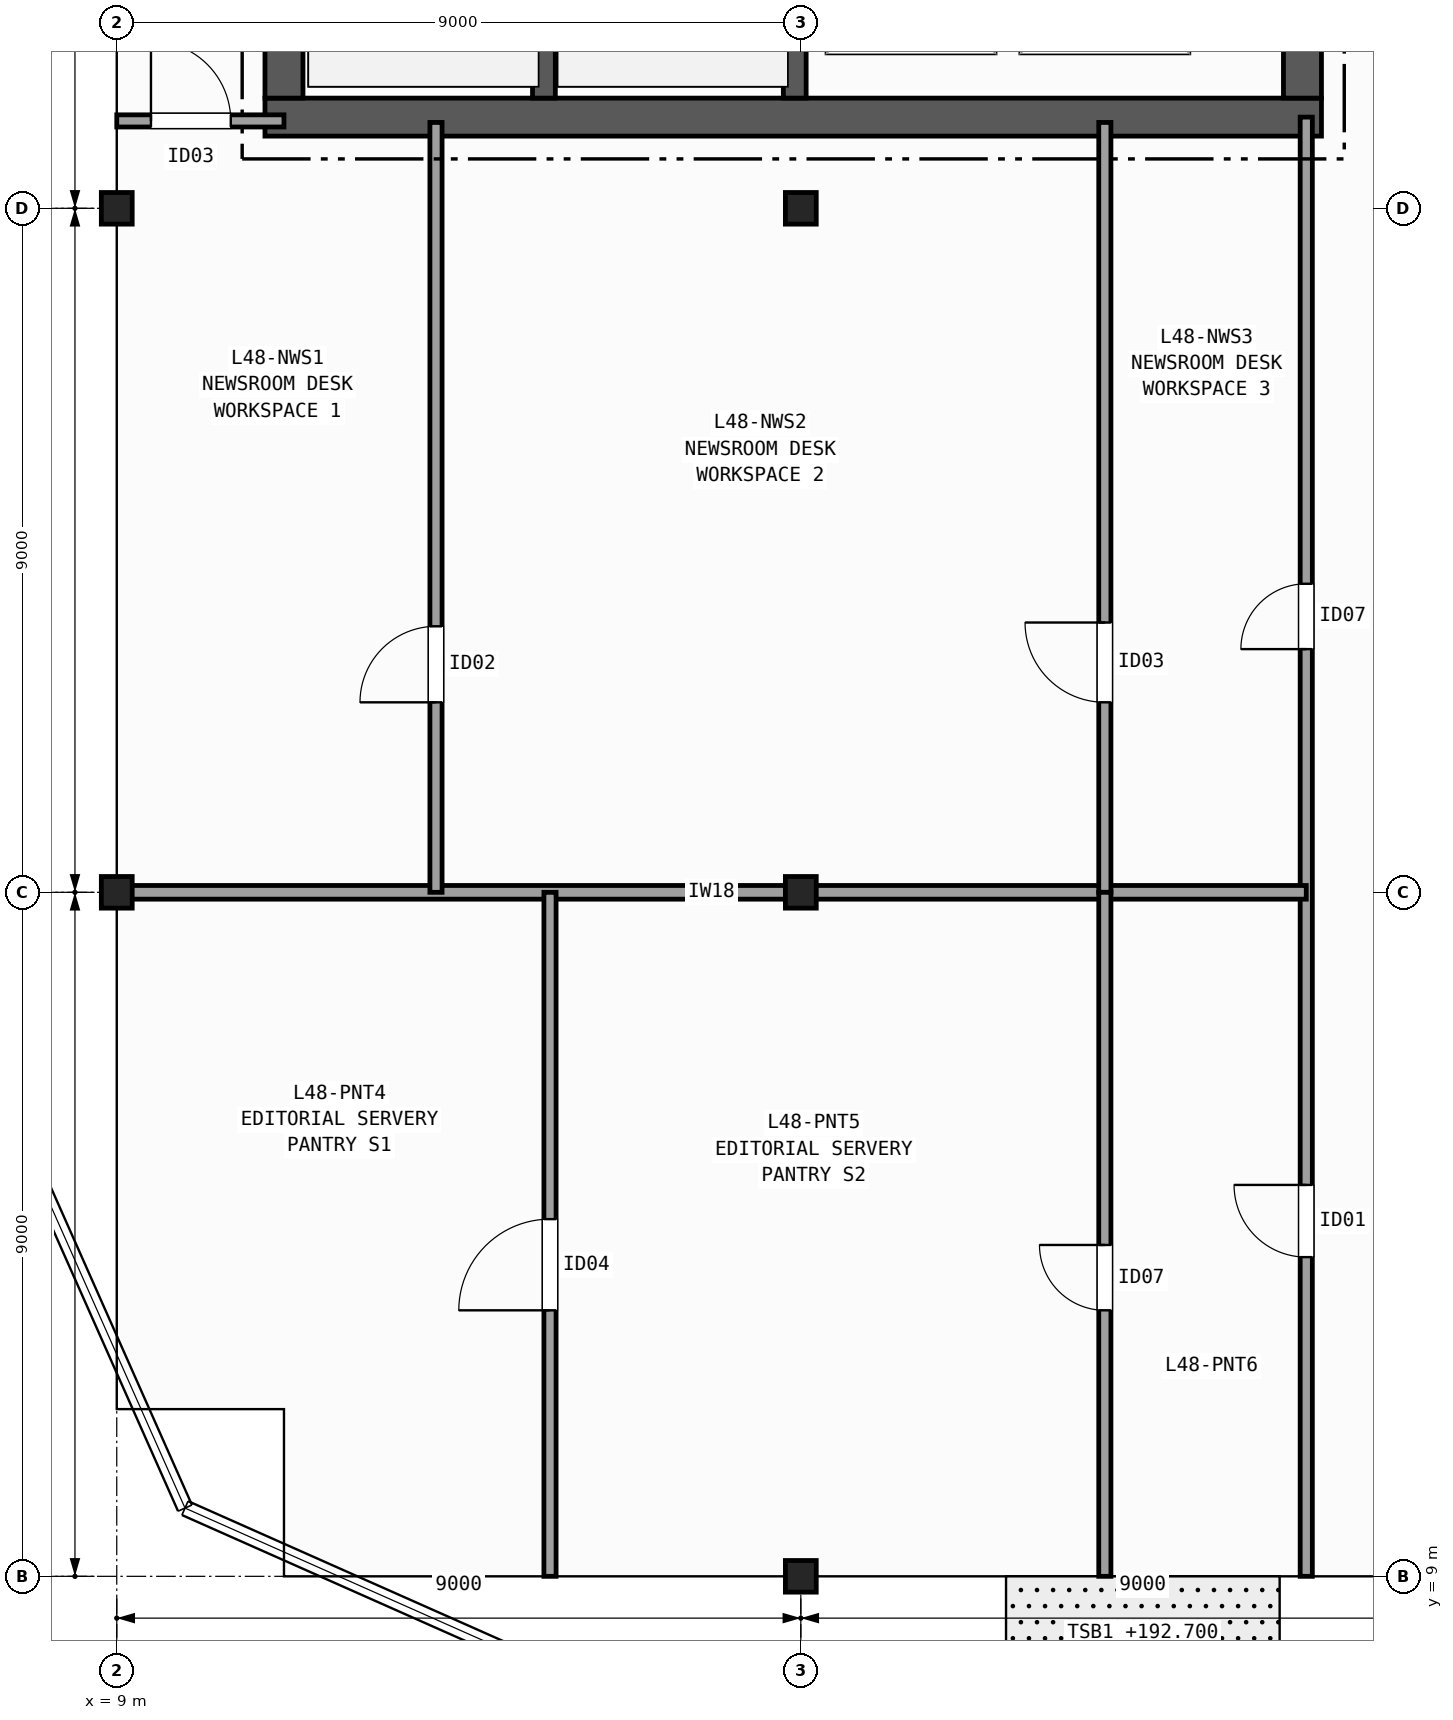
"""IFC4 building model, lengths in metres.
Left out: names, types, materials, properties, quantities, classifications, styles, units other than length and angle.
Written with IfcOpenShell. Run it as: python <this file> out.ifc"""

import sys

from ifc_helpers import new_model, si_unit, direction, frame, frame_2d, origin, origin_2d, place, context, subcontext, project, spatial, rectangle, i_section, extrude, element, fill, save


model = new_model("IFC4")
c1 = context("Model", 3, precision=1e-05, world=origin(), true_north=direction((0.0, 1.0)))
c2 = subcontext(c1, "Body", "Model", "MODEL_VIEW")
j1 = project(units=[si_unit("LENGTHUNIT", "METRE"), si_unit("PLANEANGLEUNIT", "RADIAN")], contexts=[c1])
p1 = place(None, origin())
s1 = spatial("IfcSite", under=j1, at=p1, CompositionType="ELEMENT")
p2 = place(p1, origin())
s2 = spatial("IfcBuilding", under=s1, at=p2, CompositionType="ELEMENT")
p3 = place(p2, frame((0.0, 0.0, 192.7)))
s3 = spatial("IfcBuildingStorey", under=s2, at=p3, CompositionType="ELEMENT", Elevation=192.7)
for number, where, z_axis, x_axis in (
    (1, (9.0, 18.0, 0.0), (0.0, 0.0, 1.0), (1.0, 0.0, 0.0)),
    (2, (9.0, 27.0, 0.0), (0.0, 0.0, 1.0), (1.0, 0.0, 0.0)),
    (3, (18.0, 9.0, 0.0), (0.0, 0.0, 1.0), (1.0, 0.0, 0.0)),
    (4, (18.0, 18.0, 0.0), (0.0, 0.0, 1.0), (1.0, 0.0, 0.0)),
    (5, (18.0, 27.0, 0.0), (0.0, 0.0, 1.0), (1.0, 0.0, 0.0)),
):
    element("IfcColumn", number, at=place(p3, frame(where, z_axis=z_axis, x_axis=x_axis)), inside=s3, PredefinedType="COLUMN", context=c2, shape_type="SweptSolid", body=[
        extrude(i_section(OverallWidth=0.406, OverallDepth=0.416, WebThickness=0.03, FlangeThickness=0.048, FilletRadius=0.015, at=origin_2d()), origin(), (0.0, 0.0, 1.0), 3.7),
    ])
p4 = place(p3, frame((10.95, 28.2, 0.0), z_axis=(0.0, 0.0, 1.0), x_axis=(1.0, 0.0, 0.0)))
e6 = element("IfcWall", 6, at=p4, inside=s3, PredefinedType="SHEAR", context=c2, shape_type="SweptSolid", body=[
    extrude(rectangle(XDim=13.9, YDim=0.5, at=frame_2d((6.95, 0.0))), origin(), (0.0, 0.0, 1.0), 3.37),
])
p5 = place(p3, frame((11.2, 42.15, 0.0), z_axis=(0.0, 0.0, 1.0), x_axis=(0.0, -1.0, 0.0)))
e7 = element("IfcWall", 7, at=p5, inside=s3, PredefinedType="SHEAR", context=c2, shape_type="SweptSolid", body=[
    extrude(rectangle(XDim=13.7, YDim=0.5, at=frame_2d((6.85, 0.0))), origin(), (0.0, 0.0, 1.0), 3.37),
])
p6 = place(p3, frame((24.6, 28.45, 0.0), z_axis=(0.0, 0.0, 1.0), x_axis=(0.0, 1.0, 0.0)))
e8 = element("IfcWall", 8, at=p6, inside=s3, PredefinedType="SHEAR", context=c2, shape_type="SweptSolid", body=[
    extrude(rectangle(XDim=13.7, YDim=0.5, at=frame_2d((6.85, 0.0))), origin(), (0.0, 0.0, 1.0), 3.37),
])
p7 = place(p6, frame((3.35, 0.0, 0.0)))
e9 = element("IfcOpeningElement", 9, at=p7, cuts=e8, PredefinedType="OPENING", context=c2, shape_type="SweptSolid", body=[
    extrude(rectangle(XDim=1.5, YDim=2.2, at=frame_2d((0.75, 1.1))), frame((0.0, 0.26, 0.0), z_axis=(0.0, -1.0, 0.0), x_axis=(1.0, 0.0, 0.0)), (0.0, 0.0, 1.0), 0.52),
])
p8 = place(p6, frame((9.95, 0.0, 0.0)))
e10 = element("IfcOpeningElement", 10, at=p8, cuts=e8, PredefinedType="OPENING", context=c2, shape_type="SweptSolid", body=[
    extrude(rectangle(XDim=0.9, YDim=2.1, at=frame_2d((0.45, 1.05))), frame((0.0, 0.26, 0.0), z_axis=(0.0, -1.0, 0.0), x_axis=(1.0, 0.0, 0.0)), (0.0, 0.0, 1.0), 0.52),
])
p9 = place(p3, frame((14.62, 28.45, 0.0), z_axis=(0.0, 0.0, 1.0), x_axis=(0.0, 1.0, 0.0)))
e11 = element("IfcWall", 11, at=p9, inside=s3, PredefinedType="SHEAR", context=c2, shape_type="SweptSolid", body=[
    extrude(rectangle(XDim=9.0, YDim=0.3, at=frame_2d((4.5, 0.0))), origin(), (0.0, 0.0, 1.0), 3.37),
])
p10 = place(p3, frame((17.92, 42.15, 0.0), z_axis=(0.0, 0.0, 1.0), x_axis=(0.0, -1.0, 0.0)))
e12 = element("IfcWall", 12, at=p10, inside=s3, PredefinedType="SHEAR", context=c2, shape_type="SweptSolid", body=[
    extrude(rectangle(XDim=13.7, YDim=0.3, at=frame_2d((6.85, 0.0))), origin(), (0.0, 0.0, 1.0), 3.37),
])
p11 = place(p10, frame((1.975, 0.0, 0.0)))
e13 = element("IfcOpeningElement", 13, at=p11, cuts=e12, PredefinedType="OPENING", context=c2, shape_type="SweptSolid", body=[
    extrude(rectangle(XDim=1.15, YDim=2.15, at=frame_2d((0.575, 1.075))), frame((0.0, 0.16, 0.0), z_axis=(0.0, -1.0, 0.0), x_axis=(1.0, 0.0, 0.0)), (0.0, 0.0, 1.0), 0.32),
])
p12 = place(p3, frame((9.0, 28.15, 0.0), z_axis=(0.0, 0.0, 1.0), x_axis=(1.0, 0.0, 0.0)))
e14 = element("IfcWall", 14, at=p12, inside=s3, PredefinedType="PARTITIONING", context=c2, shape_type="SweptSolid", body=[
    extrude(rectangle(XDim=2.2, YDim=0.16, at=frame_2d((1.1, 0.0))), origin(), (0.0, 0.0, 1.0), 2.584),
])
p13 = place(p12, frame((0.45, 0.0, 0.0)))
e15 = element("IfcOpeningElement", 15, at=p13, cuts=e14, PredefinedType="OPENING", context=c2, shape_type="SweptSolid", body=[
    extrude(rectangle(XDim=1.05, YDim=2.15, at=frame_2d((0.525, 1.075))), frame((0.0, 0.09, 0.0), z_axis=(0.0, -1.0, 0.0), x_axis=(1.0, 0.0, 0.0)), (0.0, 0.0, 1.0), 0.18),
])
p14 = place(p3, frame((24.65, 9.0, 0.0), z_axis=(0.0, 0.0, 1.0), x_axis=(0.0, 1.0, 0.0)))
e16 = element("IfcWall", 16, at=p14, inside=s3, PredefinedType="PARTITIONING", context=c2, shape_type="SweptSolid", body=[
    extrude(rectangle(XDim=19.2, YDim=0.16, at=frame_2d((9.6, 0.0))), origin(), (0.0, 0.0, 1.0), 2.584),
])
p15 = place(p14, frame((12.2, 0.0, 0.0)))
e17 = element("IfcOpeningElement", 17, at=p15, cuts=e16, PredefinedType="OPENING", context=c2, shape_type="SweptSolid", body=[
    extrude(rectangle(XDim=0.86, YDim=2.05, at=frame_2d((0.43, 1.025))), frame((0.0, 0.09, 0.0), z_axis=(0.0, -1.0, 0.0), x_axis=(1.0, 0.0, 0.0)), (0.0, 0.0, 1.0), 0.18),
])
p16 = place(p14, frame((4.2, 0.0, 0.0)))
e18 = element("IfcOpeningElement", 18, at=p16, cuts=e16, PredefinedType="OPENING", context=c2, shape_type="SweptSolid", body=[
    extrude(rectangle(XDim=0.95, YDim=2.1, at=frame_2d((0.475, 1.05))), frame((0.0, 0.09, 0.0), z_axis=(0.0, -1.0, 0.0), x_axis=(1.0, 0.0, 0.0)), (0.0, 0.0, 1.0), 0.18),
])
p17 = place(p3, frame((9.0, 18.0, 0.0), z_axis=(0.0, 0.0, 1.0), x_axis=(1.0, 0.0, 0.0)))
e19 = element("IfcWall", 19, at=p17, inside=s3, PredefinedType="PARTITIONING", context=c2, shape_type="SweptSolid", body=[
    extrude(rectangle(XDim=15.65, YDim=0.18, at=frame_2d((7.825, 0.0))), origin(), (0.0, 0.0, 1.0), 2.584),
])
p18 = place(p3, frame((13.2, 18.0, 0.0), z_axis=(0.0, 0.0, 1.0), x_axis=(0.0, 1.0, 0.0)))
e20 = element("IfcWall", 20, at=p18, inside=s3, PredefinedType="PARTITIONING", context=c2, shape_type="SweptSolid", body=[
    extrude(rectangle(XDim=10.13, YDim=0.16, at=frame_2d((5.065, 0.0))), origin(), (0.0, 0.0, 1.0), 2.739),
])
p19 = place(p18, frame((2.5, 0.0, 0.0)))
e21 = element("IfcOpeningElement", 21, at=p19, cuts=e20, PredefinedType="OPENING", context=c2, shape_type="SweptSolid", body=[
    extrude(rectangle(XDim=1.0, YDim=2.1, at=frame_2d((0.5, 1.05))), frame((0.0, 0.09, 0.0), z_axis=(0.0, -1.0, 0.0), x_axis=(1.0, 0.0, 0.0)), (0.0, 0.0, 1.0), 0.18),
])
p20 = place(p3, frame((22.0, 18.0, 0.0), z_axis=(0.0, 0.0, 1.0), x_axis=(0.0, 1.0, 0.0)))
e22 = element("IfcWall", 22, at=p20, inside=s3, PredefinedType="PARTITIONING", context=c2, shape_type="SweptSolid", body=[
    extrude(rectangle(XDim=10.13, YDim=0.16, at=frame_2d((5.065, 0.0))), origin(), (0.0, 0.0, 1.0), 2.739),
])
p21 = place(p20, frame((2.5, 0.0, 0.0)))
e23 = element("IfcOpeningElement", 23, at=p21, cuts=e22, PredefinedType="OPENING", context=c2, shape_type="SweptSolid", body=[
    extrude(rectangle(XDim=1.05, YDim=2.15, at=frame_2d((0.525, 1.075))), frame((0.0, 0.09, 0.0), z_axis=(0.0, -1.0, 0.0), x_axis=(1.0, 0.0, 0.0)), (0.0, 0.0, 1.0), 0.18),
])
p22 = place(p3, frame((14.7, 9.0, 0.0), z_axis=(0.0, 0.0, 1.0), x_axis=(0.0, 1.0, 0.0)))
e24 = element("IfcWall", 24, at=p22, inside=s3, PredefinedType="PARTITIONING", context=c2, shape_type="SweptSolid", body=[
    extrude(rectangle(XDim=9.0, YDim=0.16, at=frame_2d((4.5, 0.0))), origin(), (0.0, 0.0, 1.0), 2.739),
])
p23 = place(p22, frame((3.5, 0.0, 0.0)))
e25 = element("IfcOpeningElement", 25, at=p23, cuts=e24, PredefinedType="OPENING", context=c2, shape_type="SweptSolid", body=[
    extrude(rectangle(XDim=1.2, YDim=2.15, at=frame_2d((0.6, 1.075))), frame((0.0, 0.09, 0.0), z_axis=(0.0, -1.0, 0.0), x_axis=(1.0, 0.0, 0.0)), (0.0, 0.0, 1.0), 0.18),
])
p24 = place(p3, frame((22.0, 9.0, 0.0), z_axis=(0.0, 0.0, 1.0), x_axis=(0.0, 1.0, 0.0)))
e26 = element("IfcWall", 26, at=p24, inside=s3, PredefinedType="PARTITIONING", context=c2, shape_type="SweptSolid", body=[
    extrude(rectangle(XDim=9.0, YDim=0.16, at=frame_2d((4.5, 0.0))), origin(), (0.0, 0.0, 1.0), 2.584),
])
p25 = place(p24, frame((3.5, 0.0, 0.0)))
e27 = element("IfcOpeningElement", 27, at=p25, cuts=e26, PredefinedType="OPENING", context=c2, shape_type="SweptSolid", body=[
    extrude(rectangle(XDim=0.86, YDim=2.05, at=frame_2d((0.43, 1.025))), frame((0.0, 0.09, 0.0), z_axis=(0.0, -1.0, 0.0), x_axis=(1.0, 0.0, 0.0)), (0.0, 0.0, 1.0), 0.18),
])
p26 = place(p13, origin())
e28 = element("IfcDoor", 28, at=p26, inside=s3, OperationType="SINGLE_SWING_LEFT", PredefinedType="DOOR", context=c2, shape_type="SweptSolid", body=[
    extrude(rectangle(XDim=1.05, YDim=2.15, at=frame_2d((0.525, 1.075))), frame((0.0, 0.025, 0.0), z_axis=(0.0, -1.0, 0.0), x_axis=(1.0, 0.0, 0.0)), (0.0, 0.0, 1.0), 0.05),
])
fill(e15, e28)
p27 = place(p15, origin())
e29 = element("IfcDoor", 29, at=p27, inside=s3, OperationType="SINGLE_SWING_LEFT", PredefinedType="DOOR", context=c2, shape_type="SweptSolid", body=[
    extrude(rectangle(XDim=0.86, YDim=2.05, at=frame_2d((0.43, 1.025))), frame((0.0, 0.025, 0.0), z_axis=(0.0, -1.0, 0.0), x_axis=(1.0, 0.0, 0.0)), (0.0, 0.0, 1.0), 0.05),
])
fill(e17, e29)
p28 = place(p16, origin())
e30 = element("IfcDoor", 30, at=p28, inside=s3, OperationType="SINGLE_SWING_RIGHT", PredefinedType="DOOR", context=c2, shape_type="SweptSolid", body=[
    extrude(rectangle(XDim=0.95, YDim=2.1, at=frame_2d((0.475, 1.05))), frame((0.0, 0.025, 0.0), z_axis=(0.0, -1.0, 0.0), x_axis=(1.0, 0.0, 0.0)), (0.0, 0.0, 1.0), 0.05),
])
fill(e18, e30)
p29 = place(p19, origin())
e31 = element("IfcDoor", 31, at=p29, inside=s3, OperationType="SINGLE_SWING_LEFT", PredefinedType="DOOR", context=c2, shape_type="SweptSolid", body=[
    extrude(rectangle(XDim=1.0, YDim=2.1, at=frame_2d((0.5, 1.05))), frame((0.0, 0.025, 0.0), z_axis=(0.0, -1.0, 0.0), x_axis=(1.0, 0.0, 0.0)), (0.0, 0.0, 1.0), 0.05),
])
fill(e21, e31)
p30 = place(p21, origin())
e32 = element("IfcDoor", 32, at=p30, inside=s3, OperationType="SINGLE_SWING_RIGHT", PredefinedType="DOOR", context=c2, shape_type="SweptSolid", body=[
    extrude(rectangle(XDim=1.05, YDim=2.15, at=frame_2d((0.525, 1.075))), frame((0.0, 0.025, 0.0), z_axis=(0.0, -1.0, 0.0), x_axis=(1.0, 0.0, 0.0)), (0.0, 0.0, 1.0), 0.05),
])
fill(e23, e32)
p31 = place(p23, origin())
e33 = element("IfcDoor", 33, at=p31, inside=s3, OperationType="SINGLE_SWING_LEFT", PredefinedType="DOOR", context=c2, shape_type="SweptSolid", body=[
    extrude(rectangle(XDim=1.2, YDim=2.15, at=frame_2d((0.6, 1.075))), frame((0.0, 0.025, 0.0), z_axis=(0.0, -1.0, 0.0), x_axis=(1.0, 0.0, 0.0)), (0.0, 0.0, 1.0), 0.05),
])
fill(e25, e33)
p32 = place(p25, origin())
e34 = element("IfcDoor", 34, at=p32, inside=s3, OperationType="SINGLE_SWING_RIGHT", PredefinedType="DOOR", context=c2, shape_type="SweptSolid", body=[
    extrude(rectangle(XDim=0.86, YDim=2.05, at=frame_2d((0.43, 1.025))), frame((0.0, 0.025, 0.0), z_axis=(0.0, -1.0, 0.0), x_axis=(1.0, 0.0, 0.0)), (0.0, 0.0, 1.0), 0.05),
])
fill(e27, e34)
save(model, sys.argv[1])
